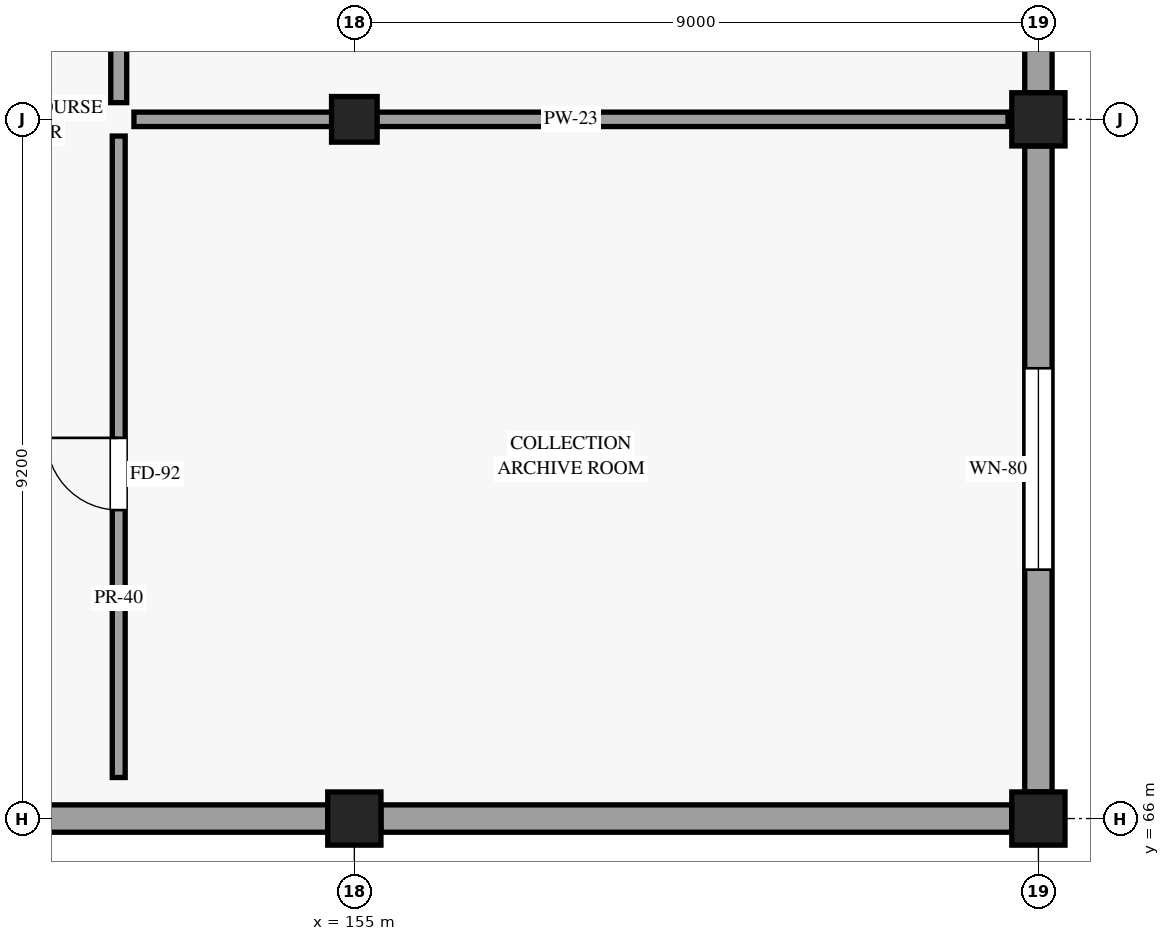
"""IFC4 building model, lengths in metres.
Left out: names, types, materials, properties, quantities, classifications, styles, units other than length and angle.
Written with IfcOpenShell. Run it as: python <this file> out.ifc"""

import sys

from ifc_helpers import new_model, si_unit, direction, frame, frame_2d, origin, origin_2d, place, context, subcontext, project, spatial, rectangle, extrude, element, fill, save


model = new_model("IFC4")
c1 = context("Model", 3, precision=1e-05, world=origin(), true_north=direction((0.0, 1.0)))
c2 = subcontext(c1, "Body", "Model", "MODEL_VIEW")
j1 = project(units=[si_unit("LENGTHUNIT", "METRE"), si_unit("PLANEANGLEUNIT", "RADIAN")], contexts=[c1])
p1 = place(None, origin())
s1 = spatial("IfcSite", under=j1, at=p1, CompositionType="ELEMENT")
p2 = place(p1, origin())
s2 = spatial("IfcBuilding", under=s1, at=p2, CompositionType="ELEMENT")
p3 = place(p2, frame((0.0, 0.0, 10.2)))
s3 = spatial("IfcBuildingStorey", under=s2, at=p3, CompositionType="ELEMENT", Elevation=10.2)
p4 = place(p3, frame((155.0, 66.0, 0.0), z_axis=(0.0, 0.0, 1.0), x_axis=(1.0, 0.0, 0.0)))
e1 = element("IfcColumn", 1, at=p4, inside=s3, PredefinedType="COLUMN", context=c2, shape_type="SweptSolid", body=[
    extrude(rectangle(XDim=0.7, YDim=0.7, at=origin_2d()), origin(), (0.0, 0.0, 1.0), 4.8),
])
p5 = place(p3, frame((155.0, 75.2, 0.0), z_axis=(0.0, 0.0, 1.0), x_axis=(1.0, 0.0, 0.0)))
e2 = element("IfcColumn", 2, at=p5, inside=s3, PredefinedType="COLUMN", context=c2, shape_type="SweptSolid", body=[
    extrude(rectangle(XDim=0.6, YDim=0.6, at=origin_2d()), origin(), (0.0, 0.0, 1.0), 4.8),
])
for number, where, z_axis, x_axis in (
    (3, (164.0, 66.0, 0.0), (0.0, 0.0, 1.0), (1.0, 0.0, 0.0)),
    (4, (164.0, 75.2, 0.0), (0.0, 0.0, 1.0), (1.0, 0.0, 0.0)),
):
    element("IfcColumn", number, at=place(p3, frame(where, z_axis=z_axis, x_axis=x_axis)), inside=s3, PredefinedType="COLUMN", context=c2, shape_type="SweptSolid", body=[
        extrude(rectangle(XDim=0.7, YDim=0.7, at=origin_2d()), origin(), (0.0, 0.0, 1.0), 4.8),
    ])
for number, where, z_axis, x_axis in (
    (5, (146.35, 66.0, 0.0), (0.0, 0.0, 1.0), (1.0, 0.0, 0.0)),
    (6, (155.35, 66.0, 0.0), (0.0, 0.0, 1.0), (1.0, 0.0, 0.0)),
):
    element("IfcWall", number, at=place(p3, frame(where, z_axis=z_axis, x_axis=x_axis)), inside=s3, PredefinedType="STANDARD", context=c2, shape_type="SweptSolid", body=[
        extrude(rectangle(XDim=8.3, YDim=0.36, at=frame_2d((4.15, 0.0))), origin(), (0.0, 0.0, 1.0), 3.715),
    ])
p6 = place(p3, frame((164.0, 66.35, 0.0), z_axis=(0.0, 0.0, 1.0), x_axis=(0.0, 1.0, 0.0)))
e7 = element("IfcWall", 7, at=p6, inside=s3, PredefinedType="STANDARD", context=c2, shape_type="SweptSolid", body=[
    extrude(rectangle(XDim=8.5, YDim=0.36, at=frame_2d((4.25, 0.0))), origin(), (0.0, 0.0, 1.0), 3.715),
])
p7 = place(p6, frame((5.575, 0.0, 0.85), z_axis=(0.0, 0.0, 1.0), x_axis=(-1.0, 0.0, 0.0)))
e8 = element("IfcOpeningElement", 8, at=p7, cuts=e7, PredefinedType="OPENING", context=c2, shape_type="SweptSolid", body=[
    extrude(rectangle(XDim=2.65, YDim=2.45, at=frame_2d((1.325, 1.225))), frame((0.0, 0.19, 0.0), z_axis=(0.0, -1.0, 0.0), x_axis=(1.0, 0.0, 0.0)), (0.0, 0.0, 1.0), 0.38),
])
p8 = place(p3, frame((164.0, 75.55, 0.0), z_axis=(0.0, 0.0, 1.0), x_axis=(0.0, 1.0, 0.0)))
e9 = element("IfcWall", 9, at=p8, inside=s3, PredefinedType="STANDARD", context=c2, shape_type="SweptSolid", body=[
    extrude(rectangle(XDim=8.5, YDim=0.36, at=frame_2d((4.25, 0.0))), origin(), (0.0, 0.0, 1.0), 3.715),
])
p9 = place(p8, frame((5.625, 0.0, 0.85), z_axis=(0.0, 0.0, 1.0), x_axis=(-1.0, 0.0, 0.0)))
e10 = element("IfcOpeningElement", 10, at=p9, cuts=e9, PredefinedType="OPENING", context=c2, shape_type="SweptSolid", body=[
    extrude(rectangle(XDim=2.75, YDim=2.45, at=frame_2d((1.375, 1.225))), frame((0.0, 0.19, 0.0), z_axis=(0.0, -1.0, 0.0), x_axis=(1.0, 0.0, 0.0)), (0.0, 0.0, 1.0), 0.38),
])
p10 = place(p3, frame((151.9, 66.54, 0.0), z_axis=(0.0, 0.0, 1.0), x_axis=(0.0, 1.0, 0.0)))
e11 = element("IfcWall", 11, at=p10, inside=s3, PredefinedType="PARTITIONING", context=c2, shape_type="SweptSolid", body=[
    extrude(rectangle(XDim=8.44, YDim=0.17, at=frame_2d((4.22, 0.0))), origin(), (0.0, 0.0, 1.0), 3.715),
])
p11 = place(p10, frame((3.519, 0.0, 0.0)))
e12 = element("IfcOpeningElement", 12, at=p11, cuts=e11, PredefinedType="OPENING", context=c2, shape_type="SweptSolid", body=[
    extrude(rectangle(XDim=0.95, YDim=2.15, at=frame_2d((0.475, 1.075))), frame((0.0, 0.095, 0.0), z_axis=(0.0, -1.0, 0.0), x_axis=(1.0, 0.0, 0.0)), (0.0, 0.0, 1.0), 0.19),
])
p12 = place(p3, frame((152.1, 75.2, 0.0), z_axis=(0.0, 0.0, 1.0), x_axis=(1.0, 0.0, 0.0)))
e13 = element("IfcWall", 13, at=p12, inside=s3, PredefinedType="PARTITIONING", context=c2, shape_type="SweptSolid", body=[
    extrude(rectangle(XDim=11.5, YDim=0.19, at=frame_2d((5.75, 0.0))), origin(), (0.0, 0.0, 1.0), 3.715),
])
p13 = place(p3, frame((151.9, 75.42, 0.0), z_axis=(0.0, 0.0, 1.0), x_axis=(0.0, 1.0, 0.0)))
e14 = element("IfcWall", 14, at=p13, inside=s3, PredefinedType="PARTITIONING", context=c2, shape_type="SweptSolid", body=[
    extrude(rectangle(XDim=8.76, YDim=0.21, at=frame_2d((4.38, 0.0))), origin(), (0.0, 0.0, 1.0), 3.715),
])
p14 = place(p13, frame((3.88, 0.0, 0.0)))
e15 = element("IfcOpeningElement", 15, at=p14, cuts=e14, PredefinedType="OPENING", context=c2, shape_type="SweptSolid", body=[
    extrude(rectangle(XDim=1.0, YDim=2.2, at=frame_2d((0.5, 1.1))), frame((0.0, 0.115, 0.0), z_axis=(0.0, -1.0, 0.0), x_axis=(1.0, 0.0, 0.0)), (0.0, 0.0, 1.0), 0.23),
])
p15 = place(p7, origin())
e16 = element("IfcWindow", 16, at=p15, inside=s3, PartitioningType="SINGLE_PANEL", PredefinedType="WINDOW", context=c2, shape_type="SweptSolid", body=[
    extrude(rectangle(XDim=2.65, YDim=2.45, at=frame_2d((1.325, 1.225))), frame((0.0, 0.03, 0.0), z_axis=(0.0, -1.0, 0.0), x_axis=(1.0, 0.0, 0.0)), (0.0, 0.0, 1.0), 0.06),
])
fill(e8, e16)
p16 = place(p11, origin())
e17 = element("IfcDoor", 17, at=p16, inside=s3, OperationType="SINGLE_SWING_RIGHT", PredefinedType="DOOR", context=c2, shape_type="SweptSolid", body=[
    extrude(rectangle(XDim=0.95, YDim=2.15, at=frame_2d((0.475, 1.075))), frame((0.0, 0.025, 0.0), z_axis=(0.0, -1.0, 0.0), x_axis=(1.0, 0.0, 0.0)), (0.0, 0.0, 1.0), 0.05),
])
fill(e12, e17)
save(model, sys.argv[1])
